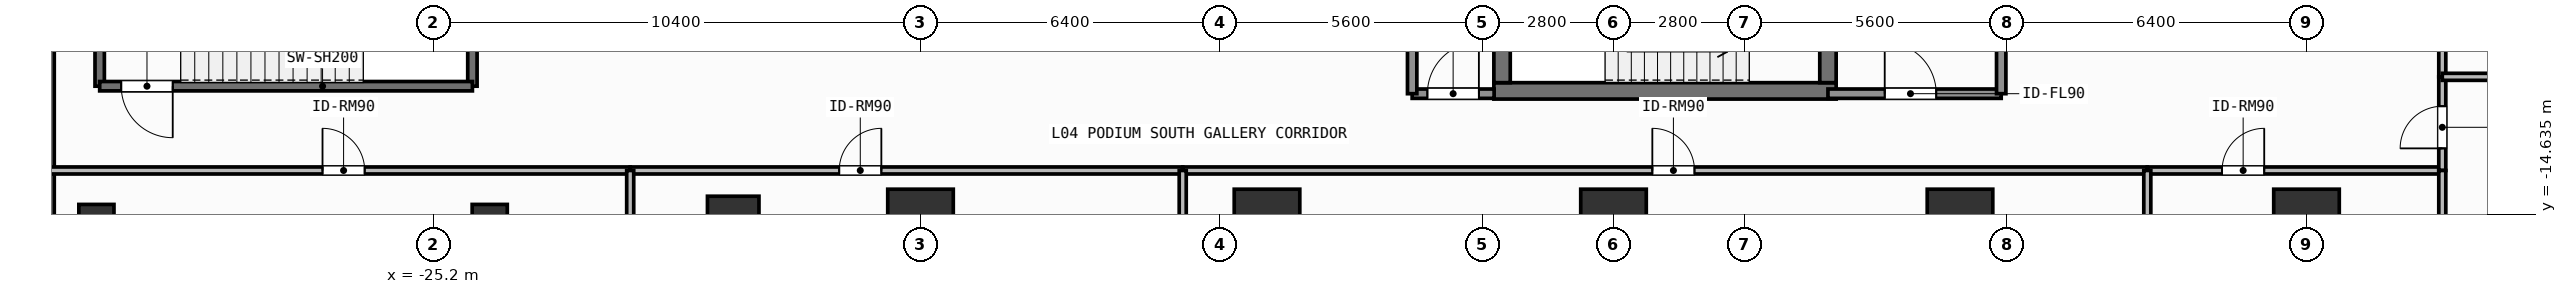
"""IFC4 building model, lengths in metres.
Left out: names, types, materials, properties, quantities, classifications, styles, units other than length and angle.
Written with IfcOpenShell. Run it as: python <this file> out.ifc"""

import sys

from ifc_helpers import new_model, si_unit, direction, frame, frame_2d, origin, origin_2d, place, context, subcontext, project, spatial, rectangle, extrude, element, fill, save


model = new_model("IFC4")
c1 = context("Model", 3, precision=1e-05, world=origin(), true_north=direction((0.0, 1.0)))
c2 = subcontext(c1, "Body", "Model", "MODEL_VIEW")
j1 = project(units=[si_unit("LENGTHUNIT", "METRE"), si_unit("PLANEANGLEUNIT", "RADIAN")], contexts=[c1])
p1 = place(None, origin())
s1 = spatial("IfcSite", under=j1, at=p1, CompositionType="ELEMENT")
p2 = place(p1, origin())
s2 = spatial("IfcBuilding", under=s1, at=p2, CompositionType="ELEMENT")
p3 = place(p2, frame((0.0, 0.0, 13.2)))
s3 = spatial("IfcBuildingStorey", under=s2, at=p3, CompositionType="ELEMENT", Elevation=13.2)
p4 = place(p3, frame((-2.555, -12.0, 0.0), z_axis=(0.0, 0.0, 1.0), x_axis=(1.0, 0.0, 0.0)))
e1 = element("IfcWall", 1, at=p4, inside=s3, PredefinedType="SHEAR", context=c2, shape_type="SweptSolid", body=[
    extrude(rectangle(XDim=7.31, YDim=0.35, at=frame_2d((3.655, 0.0))), origin(), (0.0, 0.0, 1.0), 4.2),
])
p5 = place(p3, frame((-2.38, -11.825, 0.0), z_axis=(0.0, 0.0, 1.0), x_axis=(0.0, 1.0, 0.0)))
e2 = element("IfcWall", 2, at=p5, inside=s3, PredefinedType="SHEAR", context=c2, shape_type="SweptSolid", body=[
    extrude(rectangle(XDim=2.925, YDim=0.35, at=frame_2d((1.462, 0.0))), origin(), (0.0, 0.0, 1.0), 4.2),
])
p6 = place(p3, frame((4.58, -8.9, 0.0), z_axis=(0.0, 0.0, 1.0), x_axis=(0.0, -1.0, 0.0)))
e3 = element("IfcWall", 3, at=p6, inside=s3, PredefinedType="SHEAR", context=c2, shape_type="SweptSolid", body=[
    extrude(rectangle(XDim=2.925, YDim=0.35, at=frame_2d((1.462, 0.0))), origin(), (0.0, 0.0, 1.0), 4.2),
])
p7 = place(p6, frame((0.913, 0.0, 0.0)))
e4 = element("IfcOpeningElement", 4, at=p7, cuts=e3, PredefinedType="OPENING", context=c2, shape_type="SweptSolid", body=[
    extrude(rectangle(XDim=1.1, YDim=2.15, at=frame_2d((0.55, 1.075))), frame((0.0, 0.185, 0.0), z_axis=(0.0, -1.0, 0.0), x_axis=(1.0, 0.0, 0.0)), (0.0, 0.0, 1.0), 0.37),
])
for number, where, z_axis, x_axis in (
    (5, (-14.8, -14.8, 0.0), (0.0, 0.0, 1.0), (1.0, 0.0, 0.0)),
    (6, (-7.4, -14.8, 0.0), (0.0, 0.0, 1.0), (1.0, 0.0, 0.0)),
    (7, (0.0, -14.8, 0.0), (0.0, 0.0, 1.0), (1.0, 0.0, 0.0)),
    (8, (7.4, -14.8, 0.0), (0.0, 0.0, 1.0), (1.0, 0.0, 0.0)),
    (9, (14.8, -14.8, 0.0), (0.0, 0.0, 1.0), (1.0, 0.0, 0.0)),
):
    element("IfcColumn", number, at=place(p3, frame(where, z_axis=z_axis, x_axis=x_axis)), inside=s3, PredefinedType="COLUMN", context=c2, shape_type="SweptSolid", body=[
        extrude(rectangle(XDim=1.4, YDim=1.4, at=origin_2d()), origin(), (0.0, 0.0, 1.0), 4.2),
    ])
p8 = place(p3, frame((-18.8, -14.8, 0.0), z_axis=(0.0, 0.0, 1.0), x_axis=(1.0, 0.0, 0.0)))
e10 = element("IfcColumn", 10, at=p8, inside=s3, PredefinedType="COLUMN", context=c2, shape_type="SweptSolid", body=[
    extrude(rectangle(XDim=1.1, YDim=1.1, at=origin_2d()), origin(), (0.0, 0.0, 1.0), 4.2),
])
for number, where, z_axis, x_axis in (
    (11, (-32.4, -14.8, 0.0), (0.0, 0.0, 1.0), (1.0, 0.0, 0.0)),
    (12, (-24.0, -14.8, 0.0), (0.0, 0.0, 1.0), (1.0, 0.0, 0.0)),
):
    element("IfcColumn", number, at=place(p3, frame(where, z_axis=z_axis, x_axis=x_axis)), inside=s3, PredefinedType="COLUMN", context=c2, shape_type="SweptSolid", body=[
        extrude(rectangle(XDim=0.75, YDim=0.75, at=origin_2d()), origin(), (0.0, 0.0, 1.0), 4.2),
    ])
p9 = place(p3, frame((-33.45, -20.5, 0.0), z_axis=(0.0, 0.0, 1.0), x_axis=(0.0, 1.0, 0.0)))
e13 = element("IfcWall", 13, at=p9, inside=s3, PredefinedType="SOLIDWALL", context=c2, shape_type="SweptSolid", body=[
    extrude(rectangle(XDim=14.09, YDim=0.3, at=frame_2d((7.045, 0.0))), origin(), (0.0, 0.0, 1.0), 3.96),
])
for number, where, z_axis, x_axis in (
    (14, (-32.33, -11.9, 0.0), (0.0, 0.0, 1.0), (0.0, 1.0, 0.0)),
    (15, (-24.37, -8.48, 0.0), (0.0, 0.0, 1.0), (0.0, -1.0, 0.0)),
):
    element("IfcWall", number, at=place(p3, frame(where, z_axis=z_axis, x_axis=x_axis)), inside=s3, PredefinedType="SHEAR", context=c2, shape_type="SweptSolid", body=[
        extrude(rectangle(XDim=3.42, YDim=0.2, at=frame_2d((1.71, 0.0))), origin(), (0.0, 0.0, 1.0), 3.96),
    ])
p10 = place(p3, frame((-24.37, -11.9, 0.0), z_axis=(0.0, 0.0, 1.0), x_axis=(-1.0, 0.0, 0.0)))
e16 = element("IfcWall", 16, at=p10, inside=s3, PredefinedType="SHEAR", context=c2, shape_type="SweptSolid", body=[
    extrude(rectangle(XDim=7.96, YDim=0.2, at=frame_2d((3.98, 0.0))), origin(), (0.0, 0.0, 1.0), 3.96),
])
p11 = place(p10, frame((6.4, 0.0, 0.0)))
e17 = element("IfcOpeningElement", 17, at=p11, cuts=e16, PredefinedType="OPENING", context=c2, shape_type="SweptSolid", body=[
    extrude(rectangle(XDim=1.1, YDim=2.15, at=frame_2d((0.55, 1.075))), frame((0.0, 0.11, 0.0), z_axis=(0.0, -1.0, 0.0), x_axis=(1.0, 0.0, 0.0)), (0.0, 0.0, 1.0), 0.22),
])
p12 = place(p3, frame((4.58, -12.06, 0.0), z_axis=(0.0, 0.0, 1.0), x_axis=(1.0, 0.0, 0.0)))
e18 = element("IfcWall", 18, at=p12, inside=s3, PredefinedType="SOLIDWALL", context=c2, shape_type="SweptSolid", body=[
    extrude(rectangle(XDim=3.7, YDim=0.2, at=frame_2d((1.85, 0.0))), origin(), (0.0, 0.0, 1.0), 3.96),
])
p13 = place(p12, frame((1.212, 0.0, 0.0)))
e19 = element("IfcOpeningElement", 19, at=p13, cuts=e18, PredefinedType="OPENING", context=c2, shape_type="SweptSolid", body=[
    extrude(rectangle(XDim=1.1, YDim=2.15, at=frame_2d((0.55, 1.075))), frame((0.0, 0.11, 0.0), z_axis=(0.0, -1.0, 0.0), x_axis=(1.0, 0.0, 0.0)), (0.0, 0.0, 1.0), 0.22),
])
p14 = place(p3, frame((-4.3, -12.06, 0.0), z_axis=(0.0, 0.0, 1.0), x_axis=(1.0, 0.0, 0.0)))
e20 = element("IfcWall", 20, at=p14, inside=s3, PredefinedType="SOLIDWALL", context=c2, shape_type="SweptSolid", body=[
    extrude(rectangle(XDim=1.75, YDim=0.2, at=frame_2d((0.875, 0.0))), origin(), (0.0, 0.0, 1.0), 3.96),
])
p15 = place(p14, frame((0.325, 0.0, 0.0)))
e21 = element("IfcOpeningElement", 21, at=p15, cuts=e20, PredefinedType="OPENING", context=c2, shape_type="SweptSolid", body=[
    extrude(rectangle(XDim=1.1, YDim=2.15, at=frame_2d((0.55, 1.075))), frame((0.0, 0.11, 0.0), z_axis=(0.0, -1.0, 0.0), x_axis=(1.0, 0.0, 0.0)), (0.0, 0.0, 1.0), 0.22),
])
p16 = place(p3, frame((17.7, -11.7, 0.0), z_axis=(0.0, 0.0, 1.0), x_axis=(0.0, 1.0, 0.0)))
e22 = element("IfcWall", 22, at=p16, inside=s3, PredefinedType="PARTITIONING", context=c2, shape_type="SweptSolid", body=[
    extrude(rectangle(XDim=16.98, YDim=0.15, at=frame_2d((8.49, 0.0))), origin(), (0.0, 0.0, 1.0), 3.96),
])
p17 = place(p16, frame((7.69, 0.0, 0.0)))
e23 = element("IfcOpeningElement", 23, at=p17, cuts=e22, PredefinedType="OPENING", context=c2, shape_type="SweptSolid", body=[
    extrude(rectangle(XDim=1.6, YDim=2.3, at=frame_2d((0.8, 1.15))), frame((0.0, 0.085, 0.0), z_axis=(0.0, -1.0, 0.0), x_axis=(1.0, 0.0, 0.0)), (0.0, 0.0, 1.0), 0.17),
])
p18 = place(p3, frame((-33.42, -13.7, 0.0), z_axis=(0.0, 0.0, 1.0), x_axis=(1.0, 0.0, 0.0)))
e24 = element("IfcWall", 24, at=p18, inside=s3, PredefinedType="PARTITIONING", context=c2, shape_type="SweptSolid", body=[
    extrude(rectangle(XDim=12.42, YDim=0.15, at=frame_2d((6.21, 0.0))), origin(), (0.0, 0.0, 1.0), 3.96),
])
p19 = place(p18, frame((5.849, 0.0, 0.0)))
e25 = element("IfcOpeningElement", 25, at=p19, cuts=e24, PredefinedType="OPENING", context=c2, shape_type="SweptSolid", body=[
    extrude(rectangle(XDim=0.9, YDim=2.1, at=frame_2d((0.45, 1.05))), frame((0.0, 0.085, 0.0), z_axis=(0.0, -1.0, 0.0), x_axis=(1.0, 0.0, 0.0)), (0.0, 0.0, 1.0), 0.17),
])
p20 = place(p3, frame((-21.0, -13.7, 0.0), z_axis=(0.0, 0.0, 1.0), x_axis=(1.0, 0.0, 0.0)))
e26 = element("IfcWall", 26, at=p20, inside=s3, PredefinedType="PARTITIONING", context=c2, shape_type="SweptSolid", body=[
    extrude(rectangle(XDim=11.8, YDim=0.15, at=frame_2d((5.9, 0.0))), origin(), (0.0, 0.0, 1.0), 3.96),
])
p21 = place(p20, frame((4.464, 0.0, 0.0)))
e27 = element("IfcOpeningElement", 27, at=p21, cuts=e26, PredefinedType="OPENING", context=c2, shape_type="SweptSolid", body=[
    extrude(rectangle(XDim=0.9, YDim=2.1, at=frame_2d((0.45, 1.05))), frame((0.0, 0.085, 0.0), z_axis=(0.0, -1.0, 0.0), x_axis=(1.0, 0.0, 0.0)), (0.0, 0.0, 1.0), 0.17),
])
p22 = place(p3, frame((-9.2, -13.7, 0.0), z_axis=(0.0, 0.0, 1.0), x_axis=(1.0, 0.0, 0.0)))
e28 = element("IfcWall", 28, at=p22, inside=s3, PredefinedType="PARTITIONING", context=c2, shape_type="SweptSolid", body=[
    extrude(rectangle(XDim=20.6, YDim=0.15, at=frame_2d((10.3, 0.0))), origin(), (0.0, 0.0, 1.0), 3.96),
])
p23 = place(p22, frame((10.029, 0.0, 0.0)))
e29 = element("IfcOpeningElement", 29, at=p23, cuts=e28, PredefinedType="OPENING", context=c2, shape_type="SweptSolid", body=[
    extrude(rectangle(XDim=0.9, YDim=2.1, at=frame_2d((0.45, 1.05))), frame((0.0, 0.085, 0.0), z_axis=(0.0, -1.0, 0.0), x_axis=(1.0, 0.0, 0.0)), (0.0, 0.0, 1.0), 0.17),
])
p24 = place(p3, frame((11.4, -13.7, 0.0), z_axis=(0.0, 0.0, 1.0), x_axis=(1.0, 0.0, 0.0)))
e30 = element("IfcWall", 30, at=p24, inside=s3, PredefinedType="PARTITIONING", context=c2, shape_type="SweptSolid", body=[
    extrude(rectangle(XDim=6.25, YDim=0.15, at=frame_2d((3.125, 0.0))), origin(), (0.0, 0.0, 1.0), 3.96),
])
p25 = place(p24, frame((1.597, 0.0, 0.0)))
e31 = element("IfcOpeningElement", 31, at=p25, cuts=e30, PredefinedType="OPENING", context=c2, shape_type="SweptSolid", body=[
    extrude(rectangle(XDim=0.9, YDim=2.1, at=frame_2d((0.45, 1.05))), frame((0.0, 0.085, 0.0), z_axis=(0.0, -1.0, 0.0), x_axis=(1.0, 0.0, 0.0)), (0.0, 0.0, 1.0), 0.17),
])
p26 = place(p3, frame((17.7, -13.7, 0.0), z_axis=(0.0, 0.0, 1.0), x_axis=(0.0, 1.0, 0.0)))
e32 = element("IfcWall", 32, at=p26, inside=s3, PredefinedType="PARTITIONING", context=c2, shape_type="SweptSolid", body=[
    extrude(rectangle(XDim=2.0, YDim=0.15, at=frame_2d((1.0, 0.0))), origin(), (0.0, 0.0, 1.0), 3.96),
])
p27 = place(p26, frame((0.472, 0.0, 0.0)))
e33 = element("IfcOpeningElement", 33, at=p27, cuts=e32, PredefinedType="OPENING", context=c2, shape_type="SweptSolid", body=[
    extrude(rectangle(XDim=0.9, YDim=2.1, at=frame_2d((0.45, 1.05))), frame((0.0, 0.085, 0.0), z_axis=(0.0, -1.0, 0.0), x_axis=(1.0, 0.0, 0.0)), (0.0, 0.0, 1.0), 0.17),
])
for number, where, z_axis, x_axis in (
    (34, (8.28, -12.06, 0.0), (0.0, 0.0, 1.0), (0.0, 1.0, 0.0)),
    (35, (-4.3, -12.06, 0.0), (0.0, 0.0, 1.0), (0.0, 1.0, 0.0)),
):
    element("IfcWall", number, at=place(p3, frame(where, z_axis=z_axis, x_axis=x_axis)), inside=s3, PredefinedType="SOLIDWALL", context=c2, shape_type="SweptSolid", body=[
        extrude(rectangle(XDim=3.11, YDim=0.2, at=frame_2d((1.555, 0.0))), origin(), (0.0, 0.0, 1.0), 3.96),
    ])
p28 = place(p3, frame((17.7, -11.7, 0.0), z_axis=(0.0, 0.0, 1.0), x_axis=(1.0, 0.0, 0.0)))
e36 = element("IfcWall", 36, at=p28, inside=s3, PredefinedType="PARTITIONING", context=c2, shape_type="SweptSolid", body=[
    extrude(rectangle(XDim=15.72, YDim=0.15, at=frame_2d((7.86, 0.0))), origin(), (0.0, 0.0, 1.0), 3.96),
])
for number, where, z_axis, x_axis in (
    (37, (-21.0, -24.92, 0.0), (0.0, 0.0, 1.0), (0.0, 1.0, 0.0)),
    (38, (-9.2, -24.92, 0.0), (0.0, 0.0, 1.0), (0.0, 1.0, 0.0)),
    (39, (11.4, -24.92, 0.0), (0.0, 0.0, 1.0), (0.0, 1.0, 0.0)),
    (40, (17.7, -24.92, 0.0), (0.0, 0.0, 1.0), (0.0, 1.0, 0.0)),
):
    element("IfcWall", number, at=place(p3, frame(where, z_axis=z_axis, x_axis=x_axis)), inside=s3, PredefinedType="PARTITIONING", context=c2, shape_type="SweptSolid", body=[
        extrude(rectangle(XDim=11.22, YDim=0.15, at=frame_2d((5.61, 0.0))), origin(), (0.0, 0.0, 1.0), 3.96),
    ])
p29 = place(p11, origin())
e41 = element("IfcDoor", 41, at=p29, inside=s3, OperationType="SINGLE_SWING_LEFT", PredefinedType="DOOR", context=c2, shape_type="SweptSolid", body=[
    extrude(rectangle(XDim=1.1, YDim=2.15, at=frame_2d((0.55, 1.075))), frame((0.0, 0.025, 0.0), z_axis=(0.0, -1.0, 0.0), x_axis=(1.0, 0.0, 0.0)), (0.0, 0.0, 1.0), 0.05),
])
fill(e17, e41)
p30 = place(p13, origin())
e42 = element("IfcDoor", 42, at=p30, inside=s3, OperationType="SINGLE_SWING_LEFT", PredefinedType="DOOR", context=c2, shape_type="SweptSolid", body=[
    extrude(rectangle(XDim=1.1, YDim=2.15, at=frame_2d((0.55, 1.075))), frame((0.0, 0.025, 0.0), z_axis=(0.0, -1.0, 0.0), x_axis=(1.0, 0.0, 0.0)), (0.0, 0.0, 1.0), 0.05),
])
fill(e19, e42)
p31 = place(p15, origin())
e43 = element("IfcDoor", 43, at=p31, inside=s3, OperationType="SINGLE_SWING_RIGHT", PredefinedType="DOOR", context=c2, shape_type="SweptSolid", body=[
    extrude(rectangle(XDim=1.1, YDim=2.15, at=frame_2d((0.55, 1.075))), frame((0.0, 0.025, 0.0), z_axis=(0.0, -1.0, 0.0), x_axis=(1.0, 0.0, 0.0)), (0.0, 0.0, 1.0), 0.05),
])
fill(e21, e43)
p32 = place(p19, origin())
e44 = element("IfcDoor", 44, at=p32, inside=s3, OperationType="SINGLE_SWING_LEFT", PredefinedType="DOOR", context=c2, shape_type="SweptSolid", body=[
    extrude(rectangle(XDim=0.9, YDim=2.1, at=frame_2d((0.45, 1.05))), frame((0.0, 0.025, 0.0), z_axis=(0.0, -1.0, 0.0), x_axis=(1.0, 0.0, 0.0)), (0.0, 0.0, 1.0), 0.05),
])
fill(e25, e44)
p33 = place(p21, origin())
e45 = element("IfcDoor", 45, at=p33, inside=s3, OperationType="SINGLE_SWING_RIGHT", PredefinedType="DOOR", context=c2, shape_type="SweptSolid", body=[
    extrude(rectangle(XDim=0.9, YDim=2.1, at=frame_2d((0.45, 1.05))), frame((0.0, 0.025, 0.0), z_axis=(0.0, -1.0, 0.0), x_axis=(1.0, 0.0, 0.0)), (0.0, 0.0, 1.0), 0.05),
])
fill(e27, e45)
p34 = place(p23, origin())
e46 = element("IfcDoor", 46, at=p34, inside=s3, OperationType="SINGLE_SWING_LEFT", PredefinedType="DOOR", context=c2, shape_type="SweptSolid", body=[
    extrude(rectangle(XDim=0.9, YDim=2.1, at=frame_2d((0.45, 1.05))), frame((0.0, 0.025, 0.0), z_axis=(0.0, -1.0, 0.0), x_axis=(1.0, 0.0, 0.0)), (0.0, 0.0, 1.0), 0.05),
])
fill(e29, e46)
p35 = place(p25, origin())
e47 = element("IfcDoor", 47, at=p35, inside=s3, OperationType="SINGLE_SWING_RIGHT", PredefinedType="DOOR", context=c2, shape_type="SweptSolid", body=[
    extrude(rectangle(XDim=0.9, YDim=2.1, at=frame_2d((0.45, 1.05))), frame((0.0, 0.025, 0.0), z_axis=(0.0, -1.0, 0.0), x_axis=(1.0, 0.0, 0.0)), (0.0, 0.0, 1.0), 0.05),
])
fill(e31, e47)
p36 = place(p27, origin())
e48 = element("IfcDoor", 48, at=p36, inside=s3, OperationType="SINGLE_SWING_LEFT", PredefinedType="DOOR", context=c2, shape_type="SweptSolid", body=[
    extrude(rectangle(XDim=0.9, YDim=2.1, at=frame_2d((0.45, 1.05))), frame((0.0, 0.025, 0.0), z_axis=(0.0, -1.0, 0.0), x_axis=(1.0, 0.0, 0.0)), (0.0, 0.0, 1.0), 0.05),
])
fill(e33, e48)
save(model, sys.argv[1])
